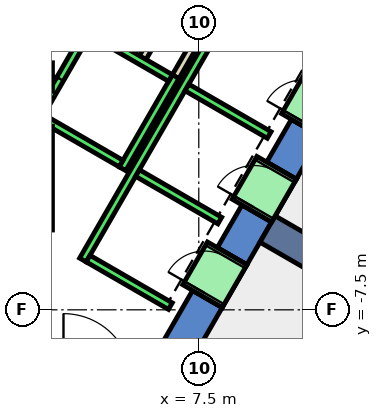
"""IFC4 building model, lengths in metres.
Left out: names, types, materials, properties, quantities, classifications, styles, units other than length and angle.
Written with IfcOpenShell. Run it as: python <this file> out.ifc"""

import sys

from ifc_helpers import new_model, si_unit, direction, frame, frame_2d, origin, place, context, subcontext, project, spatial, polyline, rectangle, outline, extrude, element, fill, save


model = new_model("IFC4")
c1 = context("Model", 3, precision=1e-05, world=origin(), true_north=direction((0.0, 1.0)))
c2 = subcontext(c1, "Body", "Model", "MODEL_VIEW")
j1 = project(units=[si_unit("LENGTHUNIT", "METRE"), si_unit("PLANEANGLEUNIT", "RADIAN")], contexts=[c1])
p1 = place(None, origin())
s1 = spatial("IfcSite", under=j1, at=p1, CompositionType="ELEMENT")
p2 = place(p1, origin())
s2 = spatial("IfcBuilding", under=s1, at=p2, CompositionType="ELEMENT")
p3 = place(p2, frame((0.0, 0.0, 120.2)))
s3 = spatial("IfcBuildingStorey", under=s2, at=p3, CompositionType="ELEMENT", Elevation=120.2)
p4 = place(p3, frame((0.0, 0.0, -0.4)))
e1 = element("IfcWall", 1, at=p4, inside=s3, PredefinedType="SHEAR", context=c2, shape_type="SweptSolid", body=[
    extrude(outline(polyline([(8.117, -7.44), (7.338, -6.99), (6.409, -8.6), (6.928, -9.5), (8.117, -7.44)])), origin(), (0.0, 0.0, 1.0), 4.2),
])
p5 = place(p3, frame((0.0, 0.0, -0.4)))
e2 = element("IfcWall", 2, at=p5, inside=s3, PredefinedType="SHEAR", context=c2, shape_type="SweptSolid", body=[
    extrude(outline(polyline([(9.417, -5.189), (8.638, -4.739), (7.988, -5.864), (8.767, -6.314), (9.417, -5.189)])), origin(), (0.0, 0.0, 1.0), 4.2),
])
p6 = place(p3, frame((0.0, 0.0, -0.4)))
e3 = element("IfcWall", 3, at=p6, inside=s3, PredefinedType="SHEAR", context=c2, shape_type="SweptSolid", body=[
    extrude(outline(polyline([(10.717, -2.937), (9.938, -2.487), (9.288, -3.613), (10.067, -4.063), (10.717, -2.937)])), origin(), (0.0, 0.0, 1.0), 4.2),
])
p7 = place(p3, frame((0.0, 0.0, 3.6)))
e4 = element("IfcWall", 4, at=p7, inside=s3, PredefinedType="SHEAR", context=c2, shape_type="SweptSolid", body=[
    extrude(outline(polyline([(8.767, -6.314), (7.988, -5.864), (7.338, -6.99), (8.117, -7.44), (8.767, -6.314)])), origin(), (0.0, 0.0, 1.0), 0.2),
])
p8 = place(p3, frame((0.0, 0.0, 3.6)))
e5 = element("IfcWall", 5, at=p8, inside=s3, PredefinedType="SHEAR", context=c2, shape_type="SweptSolid", body=[
    extrude(outline(polyline([(10.067, -4.063), (9.288, -3.613), (8.638, -4.739), (9.417, -5.189), (10.067, -4.063)])), origin(), (0.0, 0.0, 1.0), 0.2),
])
p9 = place(p3, frame((0.0, 0.0, 3.6)))
e6 = element("IfcWall", 6, at=p9, inside=s3, PredefinedType="SHEAR", context=c2, shape_type="SweptSolid", body=[
    extrude(outline(polyline([(11.367, -1.811), (10.588, -1.361), (9.938, -2.487), (10.717, -2.937), (11.367, -1.811)])), origin(), (0.0, 0.0, 1.0), 0.2),
])
p10 = place(p3, frame((9.31, -5.375, -0.4), z_axis=(0.0, 0.0, 1.0), x_axis=(0.866017533419, -0.500013631625, 0.0)))
e7 = element("IfcWall", 7, at=p10, inside=s3, PredefinedType="SHEAR", context=c2, shape_type="SweptSolid", body=[
    extrude(rectangle(XDim=9.0, YDim=0.8, at=frame_2d((4.5, 0.0))), origin(), (0.0, 0.0, 1.0), 4.2),
])
p11 = place(p3, frame((6.826, 0.522, 0.0), z_axis=(0.0, 0.0, 1.0), x_axis=(-0.500016722714, -0.866015748706, 0.0)))
e8 = element("IfcWall", 8, at=p11, inside=s3, PredefinedType="PARTITIONING", context=c2, shape_type="SweptSolid", body=[
    extrude(rectangle(XDim=1.7, YDim=0.2, at=frame_2d((0.85, 0.0))), origin(), (0.0, 0.0, 1.0), 3.8),
])
p12 = place(p3, frame((8.192, 0.888, 0.0), z_axis=(0.0, 0.0, 1.0), x_axis=(-0.499940625693, -0.866059680843, 0.0)))
e9 = element("IfcWall", 9, at=p12, inside=s3, PredefinedType="PARTITIONING", context=c2, shape_type="SweptSolid", body=[
    extrude(rectangle(XDim=2.68, YDim=0.2, at=frame_2d((1.34, 0.0))), origin(), (0.0, 0.0, 1.0), 3.8),
])
p13 = place(p3, frame((12.401, -7.621, 0.0), z_axis=(0.0, 0.0, 1.0), x_axis=(-0.499983724212, -0.866034800411, 0.0)))
e10 = element("IfcWall", 10, at=p13, inside=s3, PredefinedType="PARTITIONING", context=c2, shape_type="SweptSolid", body=[
    extrude(rectangle(XDim=9.302, YDim=0.2, at=frame_2d((4.651, 0.0))), origin(), (0.0, 0.0, 1.0), 3.8),
])
p14 = place(p3, frame((3.24, -2.488, 0.0), z_axis=(0.0, 0.0, 1.0), x_axis=(0.49994636267, 0.866056369097, 0.0)))
e11 = element("IfcWall", 11, at=p14, inside=s3, PredefinedType="STANDARD", context=c2, shape_type="SweptSolid", body=[
    extrude(rectangle(XDim=2.8, YDim=0.2, at=frame_2d((1.4, 0.0))), origin(), (0.0, 0.0, 1.0), 3.8),
])
p15 = place(p14, frame((1.225, 0.0, 0.0)))
e12 = element("IfcOpeningElement", 12, at=p15, cuts=e11, PredefinedType="OPENING", context=c2, shape_type="SweptSolid", body=[
    extrude(rectangle(XDim=1.1, YDim=2.1, at=frame_2d((0.55, 1.05))), frame((0.0, 0.11, 0.0), z_axis=(0.0, -1.0, 0.0), x_axis=(1.0, 0.0, 0.0)), (0.0, 0.0, 1.0), 0.22),
])
p16 = place(p3, frame((5.492, -3.788, 0.0), z_axis=(0.0, 0.0, 1.0), x_axis=(0.500011755427, 0.866018616679, 0.0)))
e13 = element("IfcWall", 13, at=p16, inside=s3, PredefinedType="STANDARD", context=c2, shape_type="SweptSolid", body=[
    extrude(rectangle(XDim=2.8, YDim=0.2, at=frame_2d((1.4, 0.0))), origin(), (0.0, 0.0, 1.0), 3.8),
])
p17 = place(p3, frame((3.377, -2.452, 0.0), z_axis=(0.0, 0.0, 1.0), x_axis=(0.865955154139, -0.50012165622, 0.0)))
e14 = element("IfcWall", 14, at=p17, inside=s3, PredefinedType="STANDARD", context=c2, shape_type="SweptSolid", body=[
    extrude(rectangle(XDim=2.4, YDim=0.2, at=frame_2d((1.2, 0.0))), origin(), (0.0, 0.0, 1.0), 3.8),
])
p18 = place(p3, frame((4.677, -0.2, 0.0), z_axis=(0.0, 0.0, 1.0), x_axis=(0.865973769406, -0.500089422704, 0.0)))
e15 = element("IfcWall", 15, at=p18, inside=s3, PredefinedType="STANDARD", context=c2, shape_type="SweptSolid", body=[
    extrude(rectangle(XDim=2.399, YDim=0.2, at=frame_2d((1.2, 0.0))), origin(), (0.0, 0.0, 1.0), 3.8),
])
p19 = place(p3, frame((4.451, -6.19, 0.0), z_axis=(0.0, 0.0, 1.0), x_axis=(0.50000090737, 0.866024879913, 0.0)))
e16 = element("IfcWall", 16, at=p19, inside=s3, PredefinedType="STANDARD", context=c2, shape_type="SweptSolid", body=[
    extrude(rectangle(XDim=10.6, YDim=0.2, at=frame_2d((5.3, 0.0))), origin(), (0.0, 0.0, 1.0), 3.8),
])
for number, where, z_axis, x_axis in (
    (17, (4.588, -6.153, 0.0), (0.0, 0.0, 1.0), (0.866, -0.5, 0.0)),
    (18, (5.888, -3.902, 0.0), (0.0, 0.0, 1.0), (0.866, -0.5, 0.0)),
    (19, (7.188, -1.65, 0.0), (0.0, 0.0, 1.0), (0.866, -0.5, 0.0)),
):
    element("IfcWall", number, at=place(p3, frame(where, z_axis=z_axis, x_axis=x_axis)), inside=s3, PredefinedType="STANDARD", context=c2, shape_type="SweptSolid", body=[
        extrude(rectangle(XDim=2.5, YDim=0.2, at=frame_2d((1.25, 0.0))), origin(), (0.0, 0.0, 1.0), 3.8),
    ])
p20 = place(p3, frame((7.598, -7.14, 0.0), z_axis=(0.0, 0.0, 1.0), x_axis=(0.500362116554, 0.865816234728, 0.0)))
e20 = element("IfcWall", 20, at=p20, inside=s3, PredefinedType="STANDARD", context=c2, shape_type="SweptSolid", body=[
    extrude(rectangle(XDim=1.299, YDim=1.2, at=frame_2d((0.65, 0.0))), origin(), (0.0, 0.0, 1.0), 2.4),
])
p21 = place(p20, frame((0.1, 0.0, 0.0)))
e21 = element("IfcOpeningElement", 21, at=p21, cuts=e20, PredefinedType="OPENING", context=c2, shape_type="SweptSolid", body=[
    extrude(rectangle(XDim=1.1, YDim=2.3, at=frame_2d((0.55, 1.15))), frame((0.0, 0.61, 0.0), z_axis=(0.0, -1.0, 0.0), x_axis=(1.0, 0.0, 0.0)), (0.0, 0.0, 1.0), 1.22),
])
p22 = place(p3, frame((8.898, -4.889, 0.0), z_axis=(0.0, 0.0, 1.0), x_axis=(0.500036693733, 0.866004217611, 0.0)))
e22 = element("IfcWall", 22, at=p22, inside=s3, PredefinedType="STANDARD", context=c2, shape_type="SweptSolid", body=[
    extrude(rectangle(XDim=1.3, YDim=1.2, at=frame_2d((0.65, 0.0))), origin(), (0.0, 0.0, 1.0), 2.4),
])
p23 = place(p22, frame((0.1, 0.0, 0.0)))
e23 = element("IfcOpeningElement", 23, at=p23, cuts=e22, PredefinedType="OPENING", context=c2, shape_type="SweptSolid", body=[
    extrude(rectangle(XDim=1.1, YDim=2.3, at=frame_2d((0.55, 1.15))), frame((0.0, 0.61, 0.0), z_axis=(0.0, -1.0, 0.0), x_axis=(1.0, 0.0, 0.0)), (0.0, 0.0, 1.0), 1.22),
])
p24 = place(p3, frame((10.198, -2.637, 0.0), z_axis=(0.0, 0.0, 1.0), x_axis=(0.49989585183, 0.866085525409, 0.0)))
e24 = element("IfcWall", 24, at=p24, inside=s3, PredefinedType="STANDARD", context=c2, shape_type="SweptSolid", body=[
    extrude(rectangle(XDim=1.3, YDim=1.2, at=frame_2d((0.65, 0.0))), origin(), (0.0, 0.0, 1.0), 2.4),
])
p25 = place(p24, frame((0.1, 0.0, 0.0)))
e25 = element("IfcOpeningElement", 25, at=p25, cuts=e24, PredefinedType="OPENING", context=c2, shape_type="SweptSolid", body=[
    extrude(rectangle(XDim=1.1, YDim=2.3, at=frame_2d((0.55, 1.15))), frame((0.0, 0.61, 0.0), z_axis=(0.0, -1.0, 0.0), x_axis=(1.0, 0.0, 0.0)), (0.0, 0.0, 1.0), 1.22),
])
p26 = place(p3, frame((3.55, -2.667, 0.0), z_axis=(0.0, 0.0, 1.0), x_axis=(0.0, -1.0, 0.0)))
e26 = element("IfcWall", 26, at=p26, inside=s3, PredefinedType="STANDARD", context=c2, shape_type="SweptSolid", body=[
    extrude(rectangle(XDim=2.733, YDim=0.2, at=frame_2d((1.366, 0.0))), origin(), (0.0, 0.0, 1.0), 3.8),
])
p27 = place(p3, frame((3.55, -1.0, 0.0), z_axis=(0.0, 0.0, 1.0), x_axis=(0.0, -1.0, 0.0)))
e27 = element("IfcWall", 27, at=p27, inside=s3, PredefinedType="STANDARD", context=c2, shape_type="SweptSolid", body=[
    extrude(rectangle(XDim=0.751, YDim=0.2, at=frame_2d((0.375, 0.0))), origin(), (0.0, 0.0, 1.0), 3.8),
])
p28 = place(p21, origin())
e28 = element("IfcDoor", 28, at=p28, inside=s3, OperationType="SLIDING_TO_LEFT", PredefinedType="DOOR", context=c2, shape_type="SweptSolid", body=[
    extrude(rectangle(XDim=1.1, YDim=2.3, at=frame_2d((0.55, 1.15))), frame((0.0, 0.025, 0.0), z_axis=(0.0, -1.0, 0.0), x_axis=(1.0, 0.0, 0.0)), (0.0, 0.0, 1.0), 0.05),
])
fill(e21, e28)
p29 = place(p23, origin())
e29 = element("IfcDoor", 29, at=p29, inside=s3, OperationType="SLIDING_TO_LEFT", PredefinedType="DOOR", context=c2, shape_type="SweptSolid", body=[
    extrude(rectangle(XDim=1.1, YDim=2.3, at=frame_2d((0.55, 1.15))), frame((0.0, 0.025, 0.0), z_axis=(0.0, -1.0, 0.0), x_axis=(1.0, 0.0, 0.0)), (0.0, 0.0, 1.0), 0.05),
])
fill(e23, e29)
p30 = place(p15, origin())
e30 = element("IfcDoor", 30, at=p30, inside=s3, OperationType="SLIDING_TO_LEFT", PredefinedType="DOOR", context=c2, shape_type="SweptSolid", body=[
    extrude(rectangle(XDim=1.1, YDim=2.1, at=frame_2d((0.55, 1.05))), frame((0.0, 0.025, 0.0), z_axis=(0.0, -1.0, 0.0), x_axis=(1.0, 0.0, 0.0)), (0.0, 0.0, 1.0), 0.05),
])
fill(e12, e30)
save(model, sys.argv[1])
